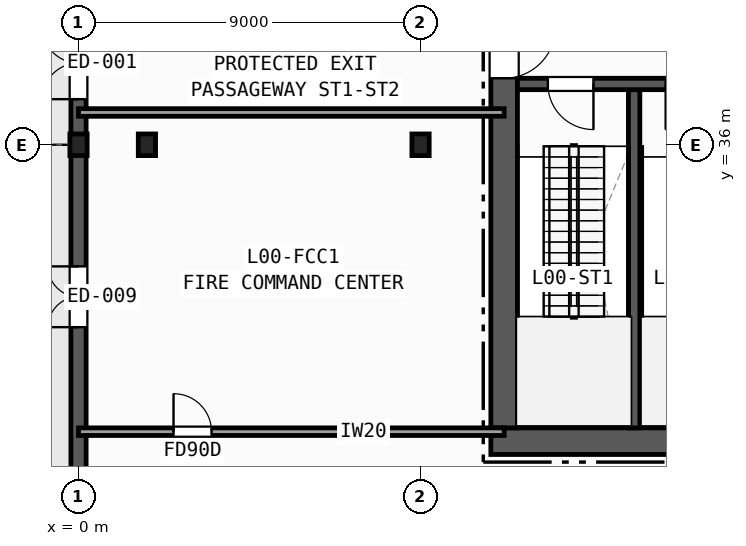
"""IFC4 building model, lengths in metres.
Left out: names, types, materials, properties, quantities, classifications, styles, units other than length and angle.
Written with IfcOpenShell. Run it as: python <this file> out.ifc"""

import sys

from ifc_helpers import new_model, si_unit, direction, frame, frame_2d, origin, origin_2d, place, context, subcontext, project, spatial, rectangle, i_section, extrude, element, fill, save


model = new_model("IFC4")
c1 = context("Model", 3, precision=1e-05, world=origin(), true_north=direction((0.0, 1.0)))
c2 = subcontext(c1, "Body", "Model", "MODEL_VIEW")
j1 = project(units=[si_unit("LENGTHUNIT", "METRE"), si_unit("PLANEANGLEUNIT", "RADIAN")], contexts=[c1])
p1 = place(None, origin())
s1 = spatial("IfcSite", under=j1, at=p1, CompositionType="ELEMENT")
p2 = place(p1, origin())
s2 = spatial("IfcBuilding", under=s1, at=p2, CompositionType="ELEMENT")
p3 = place(p2, origin())
s3 = spatial("IfcBuildingStorey", under=s2, at=p3, CompositionType="ELEMENT", Elevation=0.0)
for number, where, z_axis, x_axis in (
    (1, (0.0, 36.0, 0.0), (0.0, 0.0, 1.0), (1.0, 0.0, 0.0)),
    (2, (9.0, 36.0, 0.0), (0.0, 0.0, 1.0), (1.0, 0.0, 0.0)),
    (3, (1.8, 36.0, 0.0), (0.0, 0.0, 1.0), (1.0, 0.0, 0.0)),
):
    element("IfcColumn", number, at=place(p3, frame(where, z_axis=z_axis, x_axis=x_axis)), inside=s3, PredefinedType="COLUMN", context=c2, shape_type="SweptSolid", body=[
        extrude(i_section(OverallWidth=0.454, OverallDepth=0.569, WebThickness=0.078, FlangeThickness=0.125, FilletRadius=0.015, at=origin_2d()), origin(), (0.0, 0.0, 1.0), 5.8),
    ])
p4 = place(p3, frame((0.0, -0.2, 0.0), z_axis=(0.0, 0.0, 1.0), x_axis=(0.0, 1.0, 0.0)))
e4 = element("IfcWall", 4, at=p4, inside=s3, PredefinedType="SOLIDWALL", context=c2, shape_type="SweptSolid", body=[
    extrude(rectangle(XDim=54.4, YDim=0.4, at=frame_2d((27.2, 0.0))), origin(), (0.0, 0.0, 1.0), 5.48),
])
p5 = place(p4, frame((37.4, 0.0, 0.0)))
e5 = element("IfcOpeningElement", 5, at=p5, cuts=e4, PredefinedType="OPENING", context=c2, shape_type="SweptSolid", body=[
    extrude(rectangle(XDim=1.9, YDim=2.2, at=frame_2d((0.95, 1.1))), frame((0.0, 0.21, 0.0), z_axis=(0.0, -1.0, 0.0), x_axis=(1.0, 0.0, 0.0)), (0.0, 0.0, 1.0), 0.42),
])
p6 = place(p4, frame((19.4, 0.0, 0.0)))
e6 = element("IfcOpeningElement", 6, at=p6, cuts=e4, PredefinedType="OPENING", context=c2, shape_type="SweptSolid", body=[
    extrude(rectangle(XDim=1.6, YDim=2.2, at=frame_2d((0.8, 1.1))), frame((0.0, 0.21, 0.0), z_axis=(0.0, -1.0, 0.0), x_axis=(1.0, 0.0, 0.0)), (0.0, 0.0, 1.0), 0.42),
])
p7 = place(p4, frame((3.6, 0.0, 0.0)))
e7 = element("IfcOpeningElement", 7, at=p7, cuts=e4, PredefinedType="OPENING", context=c2, shape_type="SweptSolid", body=[
    extrude(rectangle(XDim=2.1, YDim=2.4, at=frame_2d((1.05, 1.2))), frame((0.0, 0.21, 0.0), z_axis=(0.0, -1.0, 0.0), x_axis=(1.0, 0.0, 0.0)), (0.0, 0.0, 1.0), 0.42),
])
p8 = place(p4, frame((12.6, 0.0, 0.0)))
e8 = element("IfcOpeningElement", 8, at=p8, cuts=e4, PredefinedType="OPENING", context=c2, shape_type="SweptSolid", body=[
    extrude(rectangle(XDim=2.1, YDim=2.4, at=frame_2d((1.05, 1.2))), frame((0.0, 0.21, 0.0), z_axis=(0.0, -1.0, 0.0), x_axis=(1.0, 0.0, 0.0)), (0.0, 0.0, 1.0), 0.42),
])
p9 = place(p4, frame((21.6, 0.0, 0.0)))
e9 = element("IfcOpeningElement", 9, at=p9, cuts=e4, PredefinedType="OPENING", context=c2, shape_type="SweptSolid", body=[
    extrude(rectangle(XDim=2.1, YDim=2.4, at=frame_2d((1.05, 1.2))), frame((0.0, 0.21, 0.0), z_axis=(0.0, -1.0, 0.0), x_axis=(1.0, 0.0, 0.0)), (0.0, 0.0, 1.0), 0.42),
])
p10 = place(p4, frame((31.4, 0.0, 0.0)))
e10 = element("IfcOpeningElement", 10, at=p10, cuts=e4, PredefinedType="OPENING", context=c2, shape_type="SweptSolid", body=[
    extrude(rectangle(XDim=1.6, YDim=2.2, at=frame_2d((0.8, 1.1))), frame((0.0, 0.21, 0.0), z_axis=(0.0, -1.0, 0.0), x_axis=(1.0, 0.0, 0.0)), (0.0, 0.0, 1.0), 0.42),
])
p11 = place(p3, frame((24.95, 28.2, 0.0), z_axis=(0.0, 0.0, 1.0), x_axis=(-1.0, 0.0, 0.0)))
e11 = element("IfcWall", 11, at=p11, inside=s3, PredefinedType="SHEAR", context=c2, shape_type="SweptSolid", body=[
    extrude(rectangle(XDim=14.1, YDim=0.7, at=frame_2d((7.05, 0.0))), origin(), (0.0, 0.0, 1.0), 5.48),
])
p12 = place(p3, frame((11.2, 42.05, 0.0), z_axis=(0.0, 0.0, 1.0), x_axis=(0.0, -1.0, 0.0)))
e12 = element("IfcWall", 12, at=p12, inside=s3, PredefinedType="SHEAR", context=c2, shape_type="SweptSolid", body=[
    extrude(rectangle(XDim=13.5, YDim=0.7, at=frame_2d((6.75, 0.0))), origin(), (0.0, 0.0, 1.0), 5.48),
])
p13 = place(p12, frame((2.95, 0.0, 0.0)))
e13 = element("IfcOpeningElement", 13, at=p13, cuts=e12, PredefinedType="OPENING", context=c2, shape_type="SweptSolid", body=[
    extrude(rectangle(XDim=1.35, YDim=2.15, at=frame_2d((0.675, 1.075))), frame((0.0, 0.36, 0.0), z_axis=(0.0, -1.0, 0.0), x_axis=(1.0, 0.0, 0.0)), (0.0, 0.0, 1.0), 0.72),
])
p14 = place(p3, frame((14.62, 28.55, 0.0), z_axis=(0.0, 0.0, 1.0), x_axis=(0.0, 1.0, 0.0)))
e14 = element("IfcWall", 14, at=p14, inside=s3, PredefinedType="SHEAR", context=c2, shape_type="SweptSolid", body=[
    extrude(rectangle(XDim=8.9, YDim=0.3, at=frame_2d((4.45, 0.0))), origin(), (0.0, 0.0, 1.0), 5.48),
])
p15 = place(p3, frame((17.77, 37.6, 0.0), z_axis=(0.0, 0.0, 1.0), x_axis=(-1.0, 0.0, 0.0)))
e15 = element("IfcWall", 15, at=p15, inside=s3, PredefinedType="SHEAR", context=c2, shape_type="SweptSolid", body=[
    extrude(rectangle(XDim=6.22, YDim=0.3, at=frame_2d((3.11, 0.0))), origin(), (0.0, 0.0, 1.0), 5.48),
])
p16 = place(p15, frame((4.22, 0.0, 0.0)))
e16 = element("IfcOpeningElement", 16, at=p16, cuts=e15, PredefinedType="OPENING", context=c2, shape_type="SweptSolid", body=[
    extrude(rectangle(XDim=1.2, YDim=2.15, at=frame_2d((0.6, 1.075))), frame((0.0, 0.16, 0.0), z_axis=(0.0, -1.0, 0.0), x_axis=(1.0, 0.0, 0.0)), (0.0, 0.0, 1.0), 0.32),
])
p17 = place(p15, frame((1.12, 0.0, 0.0)))
e17 = element("IfcOpeningElement", 17, at=p17, cuts=e15, PredefinedType="OPENING", context=c2, shape_type="SweptSolid", body=[
    extrude(rectangle(XDim=1.2, YDim=2.15, at=frame_2d((0.6, 1.075))), frame((0.0, 0.16, 0.0), z_axis=(0.0, -1.0, 0.0), x_axis=(1.0, 0.0, 0.0)), (0.0, 0.0, 1.0), 0.32),
])
p18 = place(p3, frame((0.0, 28.45, 0.0), z_axis=(0.0, 0.0, 1.0), x_axis=(1.0, 0.0, 0.0)))
e18 = element("IfcWall", 18, at=p18, inside=s3, PredefinedType="PARTITIONING", context=c2, shape_type="SweptSolid", body=[
    extrude(rectangle(XDim=11.2, YDim=0.2, at=frame_2d((5.6, 0.0))), origin(), (0.0, 0.0, 1.0), 4.605),
])
p19 = place(p18, frame((2.5, 0.0, 0.0)))
e19 = element("IfcOpeningElement", 19, at=p19, cuts=e18, PredefinedType="OPENING", context=c2, shape_type="SweptSolid", body=[
    extrude(rectangle(XDim=1.0, YDim=2.15, at=frame_2d((0.5, 1.075))), frame((0.0, 0.11, 0.0), z_axis=(0.0, -1.0, 0.0), x_axis=(1.0, 0.0, 0.0)), (0.0, 0.0, 1.0), 0.22),
])
p20 = place(p3, frame((0.0, 36.85, 0.0), z_axis=(0.0, 0.0, 1.0), x_axis=(1.0, 0.0, 0.0)))
e20 = element("IfcWall", 20, at=p20, inside=s3, PredefinedType="PARTITIONING", context=c2, shape_type="SweptSolid", body=[
    extrude(rectangle(XDim=11.2, YDim=0.2, at=frame_2d((5.6, 0.0))), origin(), (0.0, 0.0, 1.0), 4.605),
])
p21 = place(p5, origin())
e21 = element("IfcDoor", 21, at=p21, inside=s3, OperationType="DOUBLE_DOOR_SINGLE_SWING", PredefinedType="DOOR", context=c2, shape_type="SweptSolid", body=[
    extrude(rectangle(XDim=1.9, YDim=2.2, at=frame_2d((0.95, 1.1))), frame((0.0, 0.025, 0.0), z_axis=(0.0, -1.0, 0.0), x_axis=(1.0, 0.0, 0.0)), (0.0, 0.0, 1.0), 0.05),
])
fill(e5, e21)
p22 = place(p10, origin())
e22 = element("IfcDoor", 22, at=p22, inside=s3, OperationType="DOUBLE_DOOR_SINGLE_SWING", PredefinedType="DOOR", context=c2, shape_type="SweptSolid", body=[
    extrude(rectangle(XDim=1.6, YDim=2.2, at=frame_2d((0.8, 1.1))), frame((0.0, 0.025, 0.0), z_axis=(0.0, -1.0, 0.0), x_axis=(1.0, 0.0, 0.0)), (0.0, 0.0, 1.0), 0.05),
])
fill(e10, e22)
p23 = place(p13, origin())
e23 = element("IfcDoor", 23, at=p23, inside=s3, OperationType="SINGLE_SWING_LEFT", PredefinedType="DOOR", context=c2, shape_type="SweptSolid", body=[
    extrude(rectangle(XDim=1.35, YDim=2.15, at=frame_2d((0.675, 1.075))), frame((0.0, 0.025, 0.0), z_axis=(0.0, -1.0, 0.0), x_axis=(1.0, 0.0, 0.0)), (0.0, 0.0, 1.0), 0.05),
])
fill(e13, e23)
p24 = place(p16, origin())
e24 = element("IfcDoor", 24, at=p24, inside=s3, OperationType="SINGLE_SWING_LEFT", PredefinedType="DOOR", context=c2, shape_type="SweptSolid", body=[
    extrude(rectangle(XDim=1.2, YDim=2.15, at=frame_2d((0.6, 1.075))), frame((0.0, 0.025, 0.0), z_axis=(0.0, -1.0, 0.0), x_axis=(1.0, 0.0, 0.0)), (0.0, 0.0, 1.0), 0.05),
])
fill(e16, e24)
p25 = place(p17, origin())
e25 = element("IfcDoor", 25, at=p25, inside=s3, OperationType="SINGLE_SWING_RIGHT", PredefinedType="DOOR", context=c2, shape_type="SweptSolid", body=[
    extrude(rectangle(XDim=1.2, YDim=2.15, at=frame_2d((0.6, 1.075))), frame((0.0, 0.025, 0.0), z_axis=(0.0, -1.0, 0.0), x_axis=(1.0, 0.0, 0.0)), (0.0, 0.0, 1.0), 0.05),
])
fill(e17, e25)
p26 = place(p19, origin())
e26 = element("IfcDoor", 26, at=p26, inside=s3, OperationType="SINGLE_SWING_LEFT", PredefinedType="DOOR", context=c2, shape_type="SweptSolid", body=[
    extrude(rectangle(XDim=1.0, YDim=2.15, at=frame_2d((0.5, 1.075))), frame((0.0, 0.025, 0.0), z_axis=(0.0, -1.0, 0.0), x_axis=(1.0, 0.0, 0.0)), (0.0, 0.0, 1.0), 0.05),
])
fill(e19, e26)
save(model, sys.argv[1])
